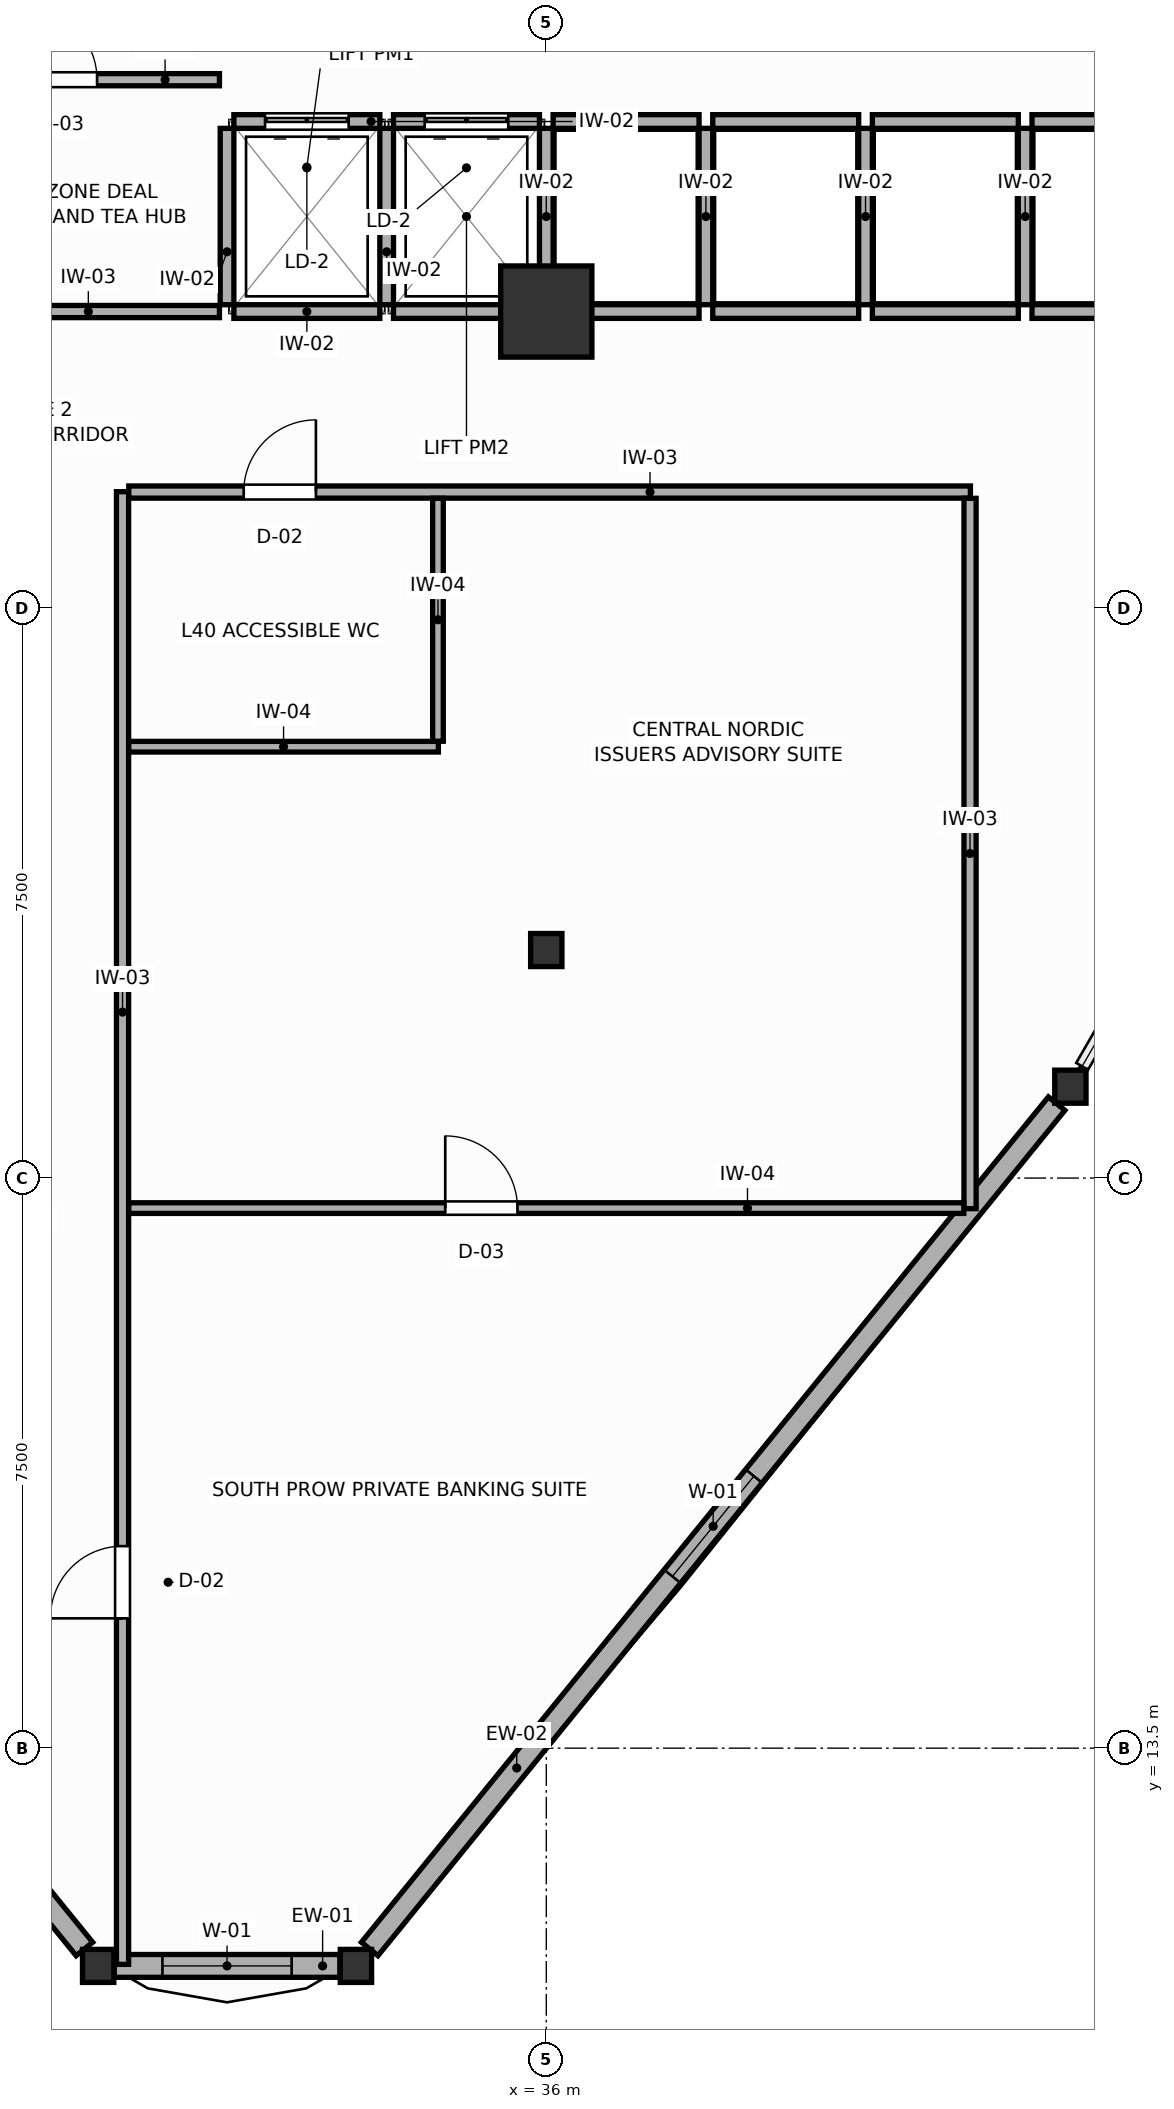
"""IFC4 building model, lengths in metres.
Left out: names, types, materials, properties, quantities, classifications, styles, units other than length and angle.
Written with IfcOpenShell. Run it as: python <this file> out.ifc"""

import sys

from ifc_helpers import new_model, si_unit, direction, frame, frame_2d, origin, origin_2d, place, context, subcontext, project, spatial, rectangle, i_section, extrude, source, transform, mapped, element, fill, save


model = new_model("IFC4")
c1 = context("Model", 3, precision=1e-05, world=origin(), true_north=direction((0.0, 1.0)))
c2 = subcontext(c1, "Body", "Model", "MODEL_VIEW")
j1 = project(units=[si_unit("LENGTHUNIT", "METRE"), si_unit("PLANEANGLEUNIT", "RADIAN")], contexts=[c1])
p1 = place(None, origin())
s1 = spatial("IfcSite", under=j1, at=p1, CompositionType="ELEMENT")
p2 = place(p1, origin())
s2 = spatial("IfcBuilding", under=s1, at=p2, CompositionType="ELEMENT")
p3 = place(p2, frame((0.0, 0.0, 157.8)))
s3 = spatial("IfcBuildingStorey", under=s2, at=p3, CompositionType="ELEMENT", Elevation=157.8)
m1 = source(origin(), c2, "Body", "SweptSolid", [
    extrude(rectangle(XDim=1.2, YDim=1.2, at=origin_2d()), origin(), (0.0, 0.0, 1.0), 3.6),
])
p4 = place(p3, frame((36.0, 32.4, 0.0), z_axis=(0.0, 0.0, 1.0), x_axis=(1.0, 0.0, 0.0)))
e1 = element("IfcColumn", 1, at=p4, inside=s3, PredefinedType="COLUMN", context=c2, shape_type="MappedRepresentation", body=[
    mapped(m1, transform((0.0, 0.0, 0.0), scale=1.0)),
])
m2 = source(origin(), c2, "Body", "SweptSolid", [
    extrude(i_section(OverallWidth=0.412, OverallDepth=0.435, WebThickness=0.033, FlangeThickness=0.053, FilletRadius=0.015, at=origin_2d()), origin(), (0.0, 0.0, 1.0), 3.6),
])
for number, where, z_axis, x_axis in (
    (2, (36.0, 24.0, 0.0), (0.0, 0.0, 1.0), (1.0, 0.0, 0.0)),
    (3, (30.104, 10.635, 0.0), (0.0, 0.0, 1.0), (1.0, 0.0, 0.0)),
    (4, (33.496, 10.635, 0.0), (0.0, 0.0, 1.0), (1.0, 0.0, 0.0)),
    (5, (42.895, 22.202, 0.0), (0.0, 0.0, 1.0), (1.0, 0.0, 0.0)),
):
    element("IfcColumn", number, at=place(p3, frame(where, z_axis=z_axis, x_axis=x_axis)), inside=s3, PredefinedType="COLUMN", context=c2, shape_type="MappedRepresentation", body=[
        mapped(m2, transform((0.0, 0.0, 0.0), scale=1.0)),
    ])
p5 = place(p3, frame((20.885, 21.98, 0.0), z_axis=(0.0, 0.0, 1.0), x_axis=(0.630659963665, -0.776059282678, 0.0)))
e6 = element("IfcWall", 6, at=p5, inside=s3, PredefinedType="SOLIDWALL", context=c2, shape_type="SweptSolid", body=[
    extrude(rectangle(XDim=14.331, YDim=0.28, at=frame_2d((7.166, 0.0))), origin(), (0.0, 0.0, 1.0), 3.0),
])
p6 = place(p5, frame((6.316, 0.0, 0.75)))
e7 = element("IfcOpeningElement", 7, at=p6, cuts=e6, PredefinedType="OPENING", context=c2, shape_type="SweptSolid", body=[
    extrude(rectangle(XDim=1.7, YDim=1.75, at=frame_2d((0.85, 0.875))), frame((0.0, 0.15, 0.0), z_axis=(0.0, -1.0, 0.0), x_axis=(1.0, 0.0, 0.0)), (0.0, 0.0, 1.0), 0.3),
])
p7 = place(p3, frame((30.315, 10.635, 0.0), z_axis=(0.0, 0.0, 1.0), x_axis=(1.0, 0.0, 0.0)))
e8 = element("IfcWall", 8, at=p7, inside=s3, PredefinedType="SOLIDWALL", context=c2, shape_type="SweptSolid", body=[
    extrude(rectangle(XDim=2.969, YDim=0.3, at=frame_2d((1.485, 0.0))), origin(), (0.0, 0.0, 1.0), 3.0),
])
p8 = place(p7, frame((0.635, 0.0, 0.75)))
e9 = element("IfcOpeningElement", 9, at=p8, cuts=e8, PredefinedType="OPENING", context=c2, shape_type="SweptSolid", body=[
    extrude(rectangle(XDim=1.7, YDim=1.75, at=frame_2d((0.85, 0.875))), frame((0.0, 0.16, 0.0), z_axis=(0.0, -1.0, 0.0), x_axis=(1.0, 0.0, 0.0)), (0.0, 0.0, 1.0), 0.32),
])
p9 = place(p3, frame((33.677, 10.858, 0.0), z_axis=(0.0, 0.0, 1.0), x_axis=(0.630649703469, 0.776067620452, 0.0)))
e10 = element("IfcWall", 10, at=p9, inside=s3, PredefinedType="SOLIDWALL", context=c2, shape_type="SweptSolid", body=[
    extrude(rectangle(XDim=14.331, YDim=0.28, at=frame_2d((7.166, 0.0))), origin(), (0.0, 0.0, 1.0), 3.0),
])
p10 = place(p9, frame((6.316, 0.0, 0.75)))
e11 = element("IfcOpeningElement", 11, at=p10, cuts=e10, PredefinedType="OPENING", context=c2, shape_type="SweptSolid", body=[
    extrude(rectangle(XDim=1.7, YDim=1.75, at=frame_2d((0.85, 0.875))), frame((0.0, 0.15, 0.0), z_axis=(0.0, -1.0, 0.0), x_axis=(1.0, 0.0, 0.0)), (0.0, 0.0, 1.0), 0.3),
])
p11 = place(p3, frame((31.89, 34.9, 0.0), z_axis=(0.0, 0.0, 1.0), x_axis=(1.0, 0.0, 0.0)))
e12 = element("IfcWall", 12, at=p11, inside=s3, PredefinedType="PARTITIONING", context=c2, shape_type="SweptSolid", body=[
    extrude(rectangle(XDim=1.92, YDim=0.18, at=frame_2d((0.96, 0.0))), origin(), (0.0, 0.0, 1.0), 3.4),
])
p12 = place(p11, frame((0.41, 0.0, 0.0)))
e13 = element("IfcOpeningElement", 13, at=p12, cuts=e12, PredefinedType="OPENING", context=c2, shape_type="SweptSolid", body=[
    extrude(rectangle(XDim=1.1, YDim=2.1, at=frame_2d((0.55, 1.05))), frame((0.0, 0.1, 0.0), z_axis=(0.0, -1.0, 0.0), x_axis=(1.0, 0.0, 0.0)), (0.0, 0.0, 1.0), 0.2),
])
p13 = place(p3, frame((31.89, 32.4, 0.0), z_axis=(0.0, 0.0, 1.0), x_axis=(1.0, 0.0, 0.0)))
e14 = element("IfcWall", 14, at=p13, inside=s3, PredefinedType="PARTITIONING", context=c2, shape_type="SweptSolid", body=[
    extrude(rectangle(XDim=1.92, YDim=0.18, at=frame_2d((0.96, 0.0))), origin(), (0.0, 0.0, 1.0), 2.95),
])
p14 = place(p3, frame((31.8, 32.49, 0.0), z_axis=(0.0, 0.0, 1.0), x_axis=(0.0, 1.0, 0.0)))
e15 = element("IfcWall", 15, at=p14, inside=s3, PredefinedType="PARTITIONING", context=c2, shape_type="SweptSolid", body=[
    extrude(rectangle(XDim=2.32, YDim=0.18, at=frame_2d((1.16, 0.0))), origin(), (0.0, 0.0, 1.0), 3.4),
])
p15 = place(p3, frame((33.99, 34.9, 0.0), z_axis=(0.0, 0.0, 1.0), x_axis=(1.0, 0.0, 0.0)))
e16 = element("IfcWall", 16, at=p15, inside=s3, PredefinedType="PARTITIONING", context=c2, shape_type="SweptSolid", body=[
    extrude(rectangle(XDim=1.92, YDim=0.18, at=frame_2d((0.96, 0.0))), origin(), (0.0, 0.0, 1.0), 3.4),
])
p16 = place(p15, frame((0.41, 0.0, 0.0)))
e17 = element("IfcOpeningElement", 17, at=p16, cuts=e16, PredefinedType="OPENING", context=c2, shape_type="SweptSolid", body=[
    extrude(rectangle(XDim=1.1, YDim=2.1, at=frame_2d((0.55, 1.05))), frame((0.0, 0.1, 0.0), z_axis=(0.0, -1.0, 0.0), x_axis=(1.0, 0.0, 0.0)), (0.0, 0.0, 1.0), 0.2),
])
p17 = place(p3, frame((33.99, 32.4, 0.0), z_axis=(0.0, 0.0, 1.0), x_axis=(1.0, 0.0, 0.0)))
e18 = element("IfcWall", 18, at=p17, inside=s3, PredefinedType="PARTITIONING", context=c2, shape_type="SweptSolid", body=[
    extrude(rectangle(XDim=1.92, YDim=0.18, at=frame_2d((0.96, 0.0))), origin(), (0.0, 0.0, 1.0), 2.95),
])
p18 = place(p3, frame((33.9, 32.49, 0.0), z_axis=(0.0, 0.0, 1.0), x_axis=(0.0, 1.0, 0.0)))
e19 = element("IfcWall", 19, at=p18, inside=s3, PredefinedType="PARTITIONING", context=c2, shape_type="SweptSolid", body=[
    extrude(rectangle(XDim=2.32, YDim=0.18, at=frame_2d((1.16, 0.0))), origin(), (0.0, 0.0, 1.0), 3.4),
])
p19 = place(p3, frame((36.09, 34.9, 0.0), z_axis=(0.0, 0.0, 1.0), x_axis=(1.0, 0.0, 0.0)))
e20 = element("IfcWall", 20, at=p19, inside=s3, PredefinedType="PARTITIONING", context=c2, shape_type="SweptSolid", body=[
    extrude(rectangle(XDim=1.92, YDim=0.18, at=frame_2d((0.96, 0.0))), origin(), (0.0, 0.0, 1.0), 3.4),
])
p20 = place(p3, frame((36.09, 32.4, 0.0), z_axis=(0.0, 0.0, 1.0), x_axis=(1.0, 0.0, 0.0)))
e21 = element("IfcWall", 21, at=p20, inside=s3, PredefinedType="PARTITIONING", context=c2, shape_type="SweptSolid", body=[
    extrude(rectangle(XDim=1.92, YDim=0.18, at=frame_2d((0.96, 0.0))), origin(), (0.0, 0.0, 1.0), 2.95),
])
p21 = place(p3, frame((36.0, 32.49, 0.0), z_axis=(0.0, 0.0, 1.0), x_axis=(0.0, 1.0, 0.0)))
e22 = element("IfcWall", 22, at=p21, inside=s3, PredefinedType="PARTITIONING", context=c2, shape_type="SweptSolid", body=[
    extrude(rectangle(XDim=2.32, YDim=0.18, at=frame_2d((1.16, 0.0))), origin(), (0.0, 0.0, 1.0), 3.4),
])
p22 = place(p3, frame((38.19, 34.9, 0.0), z_axis=(0.0, 0.0, 1.0), x_axis=(1.0, 0.0, 0.0)))
e23 = element("IfcWall", 23, at=p22, inside=s3, PredefinedType="PARTITIONING", context=c2, shape_type="SweptSolid", body=[
    extrude(rectangle(XDim=1.92, YDim=0.18, at=frame_2d((0.96, 0.0))), origin(), (0.0, 0.0, 1.0), 3.4),
])
p23 = place(p3, frame((38.19, 32.4, 0.0), z_axis=(0.0, 0.0, 1.0), x_axis=(1.0, 0.0, 0.0)))
e24 = element("IfcWall", 24, at=p23, inside=s3, PredefinedType="PARTITIONING", context=c2, shape_type="SweptSolid", body=[
    extrude(rectangle(XDim=1.92, YDim=0.18, at=frame_2d((0.96, 0.0))), origin(), (0.0, 0.0, 1.0), 2.95),
])
p24 = place(p3, frame((38.1, 32.49, 0.0), z_axis=(0.0, 0.0, 1.0), x_axis=(0.0, 1.0, 0.0)))
e25 = element("IfcWall", 25, at=p24, inside=s3, PredefinedType="PARTITIONING", context=c2, shape_type="SweptSolid", body=[
    extrude(rectangle(XDim=2.32, YDim=0.18, at=frame_2d((1.16, 0.0))), origin(), (0.0, 0.0, 1.0), 3.4),
])
p25 = place(p3, frame((40.29, 34.9, 0.0), z_axis=(0.0, 0.0, 1.0), x_axis=(1.0, 0.0, 0.0)))
e26 = element("IfcWall", 26, at=p25, inside=s3, PredefinedType="PARTITIONING", context=c2, shape_type="SweptSolid", body=[
    extrude(rectangle(XDim=1.92, YDim=0.18, at=frame_2d((0.96, 0.0))), origin(), (0.0, 0.0, 1.0), 3.4),
])
p26 = place(p3, frame((40.29, 32.4, 0.0), z_axis=(0.0, 0.0, 1.0), x_axis=(1.0, 0.0, 0.0)))
e27 = element("IfcWall", 27, at=p26, inside=s3, PredefinedType="PARTITIONING", context=c2, shape_type="SweptSolid", body=[
    extrude(rectangle(XDim=1.92, YDim=0.18, at=frame_2d((0.96, 0.0))), origin(), (0.0, 0.0, 1.0), 2.95),
])
p27 = place(p3, frame((40.2, 32.49, 0.0), z_axis=(0.0, 0.0, 1.0), x_axis=(0.0, 1.0, 0.0)))
e28 = element("IfcWall", 28, at=p27, inside=s3, PredefinedType="PARTITIONING", context=c2, shape_type="SweptSolid", body=[
    extrude(rectangle(XDim=2.32, YDim=0.18, at=frame_2d((1.16, 0.0))), origin(), (0.0, 0.0, 1.0), 3.4),
])
p28 = place(p3, frame((42.39, 34.9, 0.0), z_axis=(0.0, 0.0, 1.0), x_axis=(1.0, 0.0, 0.0)))
e29 = element("IfcWall", 29, at=p28, inside=s3, PredefinedType="PARTITIONING", context=c2, shape_type="SweptSolid", body=[
    extrude(rectangle(XDim=1.92, YDim=0.18, at=frame_2d((0.96, 0.0))), origin(), (0.0, 0.0, 1.0), 3.4),
])
p29 = place(p3, frame((42.39, 32.4, 0.0), z_axis=(0.0, 0.0, 1.0), x_axis=(1.0, 0.0, 0.0)))
e30 = element("IfcWall", 30, at=p29, inside=s3, PredefinedType="PARTITIONING", context=c2, shape_type="SweptSolid", body=[
    extrude(rectangle(XDim=1.92, YDim=0.18, at=frame_2d((0.96, 0.0))), origin(), (0.0, 0.0, 1.0), 2.95),
])
p30 = place(p3, frame((42.3, 32.49, 0.0), z_axis=(0.0, 0.0, 1.0), x_axis=(0.0, 1.0, 0.0)))
e31 = element("IfcWall", 31, at=p30, inside=s3, PredefinedType="PARTITIONING", context=c2, shape_type="SweptSolid", body=[
    extrude(rectangle(XDim=2.32, YDim=0.18, at=frame_2d((1.16, 0.0))), origin(), (0.0, 0.0, 1.0), 3.4),
])
p31 = place(p3, frame((28.25, 32.4, 0.0), z_axis=(0.0, 0.0, 1.0), x_axis=(1.0, 0.0, 0.0)))
e32 = element("IfcWall", 32, at=p31, inside=s3, PredefinedType="PARTITIONING", context=c2, shape_type="SweptSolid", body=[
    extrude(rectangle(XDim=3.45, YDim=0.16, at=frame_2d((1.725, 0.0))), origin(), (0.0, 0.0, 1.0), 2.95),
])
p32 = place(p3, frame((27.69, 35.45, 0.0), z_axis=(0.0, 0.0, 1.0), x_axis=(1.0, 0.0, 0.0)))
e33 = element("IfcWall", 33, at=p32, inside=s3, PredefinedType="PARTITIONING", context=c2, shape_type="SweptSolid", body=[
    extrude(rectangle(XDim=4.01, YDim=0.16, at=frame_2d((2.005, 0.0))), origin(), (0.0, 0.0, 1.0), 3.4),
])
p33 = place(p32, frame((1.45, 0.0, 0.0)))
e34 = element("IfcOpeningElement", 34, at=p33, cuts=e33, PredefinedType="OPENING", context=c2, shape_type="SweptSolid", body=[
    extrude(rectangle(XDim=0.95, YDim=2.05, at=frame_2d((0.475, 1.025))), frame((0.0, 0.09, 0.0), z_axis=(0.0, -1.0, 0.0), x_axis=(1.0, 0.0, 0.0)), (0.0, 0.0, 1.0), 0.18),
])
p34 = place(p3, frame((30.425, 10.655, 0.0), z_axis=(0.0, 0.0, 1.0), x_axis=(0.0, 1.0, 0.0)))
e35 = element("IfcWall", 35, at=p34, inside=s3, PredefinedType="PARTITIONING", context=c2, shape_type="SweptSolid", body=[
    extrude(rectangle(XDim=19.375, YDim=0.16, at=frame_2d((9.688, 0.0))), origin(), (0.0, 0.0, 1.0), 3.4),
])
p35 = place(p34, frame((4.552, 0.0, 0.0)))
e36 = element("IfcOpeningElement", 36, at=p35, cuts=e35, PredefinedType="OPENING", context=c2, shape_type="SweptSolid", body=[
    extrude(rectangle(XDim=0.95, YDim=2.05, at=frame_2d((0.475, 1.025))), frame((0.0, 0.09, 0.0), z_axis=(0.0, -1.0, 0.0), x_axis=(1.0, 0.0, 0.0)), (0.0, 0.0, 1.0), 0.18),
])
p36 = place(p3, frame((30.507, 30.025, 0.0), z_axis=(0.0, 0.0, 1.0), x_axis=(1.0, 0.0, 0.0)))
e37 = element("IfcWall", 37, at=p36, inside=s3, PredefinedType="PARTITIONING", context=c2, shape_type="SweptSolid", body=[
    extrude(rectangle(XDim=11.073, YDim=0.16, at=frame_2d((5.537, 0.0))), origin(), (0.0, 0.0, 1.0), 3.4),
])
p37 = place(p36, frame((1.512, 0.0, 0.0)))
e38 = element("IfcOpeningElement", 38, at=p37, cuts=e37, PredefinedType="OPENING", context=c2, shape_type="SweptSolid", body=[
    extrude(rectangle(XDim=0.95, YDim=2.05, at=frame_2d((0.475, 1.025))), frame((0.0, 0.09, 0.0), z_axis=(0.0, -1.0, 0.0), x_axis=(1.0, 0.0, 0.0)), (0.0, 0.0, 1.0), 0.18),
])
p38 = place(p3, frame((41.575, 20.598, 0.0), z_axis=(0.0, 0.0, 1.0), x_axis=(0.0, 1.0, 0.0)))
e39 = element("IfcWall", 39, at=p38, inside=s3, PredefinedType="PARTITIONING", context=c2, shape_type="SweptSolid", body=[
    extrude(rectangle(XDim=9.345, YDim=0.16, at=frame_2d((4.673, 0.0))), origin(), (0.0, 0.0, 1.0), 3.4),
])
p39 = place(p3, frame((30.507, 20.605, 0.0), z_axis=(0.0, 0.0, 1.0), x_axis=(1.0, 0.0, 0.0)))
e40 = element("IfcWall", 40, at=p39, inside=s3, PredefinedType="PARTITIONING", context=c2, shape_type="SweptSolid", body=[
    extrude(rectangle(XDim=10.986, YDim=0.14, at=frame_2d((5.493, 0.0))), origin(), (0.0, 0.0, 1.0), 3.4),
])
p40 = place(p39, frame((4.164, 0.0, 0.0)))
e41 = element("IfcOpeningElement", 41, at=p40, cuts=e40, PredefinedType="OPENING", context=c2, shape_type="SweptSolid", body=[
    extrude(rectangle(XDim=0.95, YDim=2.05, at=frame_2d((0.475, 1.025))), frame((0.0, 0.08, 0.0), z_axis=(0.0, -1.0, 0.0), x_axis=(1.0, 0.0, 0.0)), (0.0, 0.0, 1.0), 0.16),
])
p41 = place(p3, frame((30.507, 26.675, 0.0), z_axis=(0.0, 0.0, 1.0), x_axis=(1.0, 0.0, 0.0)))
e42 = element("IfcWall", 42, at=p41, inside=s3, PredefinedType="PARTITIONING", context=c2, shape_type="SweptSolid", body=[
    extrude(rectangle(XDim=4.073, YDim=0.14, at=frame_2d((2.037, 0.0))), origin(), (0.0, 0.0, 1.0), 3.4),
])
p42 = place(p3, frame((34.575, 26.747, 0.0), z_axis=(0.0, 0.0, 1.0), x_axis=(0.0, 1.0, 0.0)))
e43 = element("IfcWall", 43, at=p42, inside=s3, PredefinedType="PARTITIONING", context=c2, shape_type="SweptSolid", body=[
    extrude(rectangle(XDim=3.196, YDim=0.14, at=frame_2d((1.598, 0.0))), origin(), (0.0, 0.0, 1.0), 3.4),
])
p43 = place(p8, origin())
e44 = element("IfcWindow", 44, at=p43, inside=s3, PartitioningType="SINGLE_PANEL", PredefinedType="WINDOW", context=c2, shape_type="SweptSolid", body=[
    extrude(rectangle(XDim=1.7, YDim=1.75, at=frame_2d((0.85, 0.875))), frame((0.0, 0.03, 0.0), z_axis=(0.0, -1.0, 0.0), x_axis=(1.0, 0.0, 0.0)), (0.0, 0.0, 1.0), 0.06),
])
fill(e9, e44)
p44 = place(p10, origin())
e45 = element("IfcWindow", 45, at=p44, inside=s3, PartitioningType="SINGLE_PANEL", PredefinedType="WINDOW", context=c2, shape_type="SweptSolid", body=[
    extrude(rectangle(XDim=1.7, YDim=1.75, at=frame_2d((0.85, 0.875))), frame((0.0, 0.03, 0.0), z_axis=(0.0, -1.0, 0.0), x_axis=(1.0, 0.0, 0.0)), (0.0, 0.0, 1.0), 0.06),
])
fill(e11, e45)
p45 = place(p12, origin())
e46 = element("IfcDoor", 46, at=p45, inside=s3, OperationType="DOUBLE_DOOR_SLIDING", PredefinedType="DOOR", context=c2, shape_type="SweptSolid", body=[
    extrude(rectangle(XDim=1.1, YDim=2.1, at=frame_2d((0.55, 1.05))), frame((0.0, 0.025, 0.0), z_axis=(0.0, -1.0, 0.0), x_axis=(1.0, 0.0, 0.0)), (0.0, 0.0, 1.0), 0.05),
])
fill(e13, e46)
p46 = place(p16, origin())
e47 = element("IfcDoor", 47, at=p46, inside=s3, OperationType="DOUBLE_DOOR_SLIDING", PredefinedType="DOOR", context=c2, shape_type="SweptSolid", body=[
    extrude(rectangle(XDim=1.1, YDim=2.1, at=frame_2d((0.55, 1.05))), frame((0.0, 0.025, 0.0), z_axis=(0.0, -1.0, 0.0), x_axis=(1.0, 0.0, 0.0)), (0.0, 0.0, 1.0), 0.05),
])
fill(e17, e47)
p47 = place(p33, origin())
e48 = element("IfcDoor", 48, at=p47, inside=s3, OperationType="SINGLE_SWING_LEFT", PredefinedType="DOOR", context=c2, shape_type="SweptSolid", body=[
    extrude(rectangle(XDim=0.95, YDim=2.05, at=frame_2d((0.475, 1.025))), frame((0.0, 0.025, 0.0), z_axis=(0.0, -1.0, 0.0), x_axis=(1.0, 0.0, 0.0)), (0.0, 0.0, 1.0), 0.05),
])
fill(e34, e48)
p48 = place(p35, origin())
e49 = element("IfcDoor", 49, at=p48, inside=s3, OperationType="SINGLE_SWING_LEFT", PredefinedType="DOOR", context=c2, shape_type="SweptSolid", body=[
    extrude(rectangle(XDim=0.95, YDim=2.05, at=frame_2d((0.475, 1.025))), frame((0.0, 0.025, 0.0), z_axis=(0.0, -1.0, 0.0), x_axis=(1.0, 0.0, 0.0)), (0.0, 0.0, 1.0), 0.05),
])
fill(e36, e49)
p49 = place(p37, origin())
e50 = element("IfcDoor", 50, at=p49, inside=s3, OperationType="SINGLE_SWING_RIGHT", PredefinedType="DOOR", context=c2, shape_type="SweptSolid", body=[
    extrude(rectangle(XDim=0.95, YDim=2.05, at=frame_2d((0.475, 1.025))), frame((0.0, 0.025, 0.0), z_axis=(0.0, -1.0, 0.0), x_axis=(1.0, 0.0, 0.0)), (0.0, 0.0, 1.0), 0.05),
])
fill(e38, e50)
p50 = place(p40, origin())
e51 = element("IfcDoor", 51, at=p50, inside=s3, OperationType="SINGLE_SWING_LEFT", PredefinedType="DOOR", context=c2, shape_type="SweptSolid", body=[
    extrude(rectangle(XDim=0.95, YDim=2.05, at=frame_2d((0.475, 1.025))), frame((0.0, 0.025, 0.0), z_axis=(0.0, -1.0, 0.0), x_axis=(1.0, 0.0, 0.0)), (0.0, 0.0, 1.0), 0.05),
])
fill(e41, e51)
save(model, sys.argv[1])
